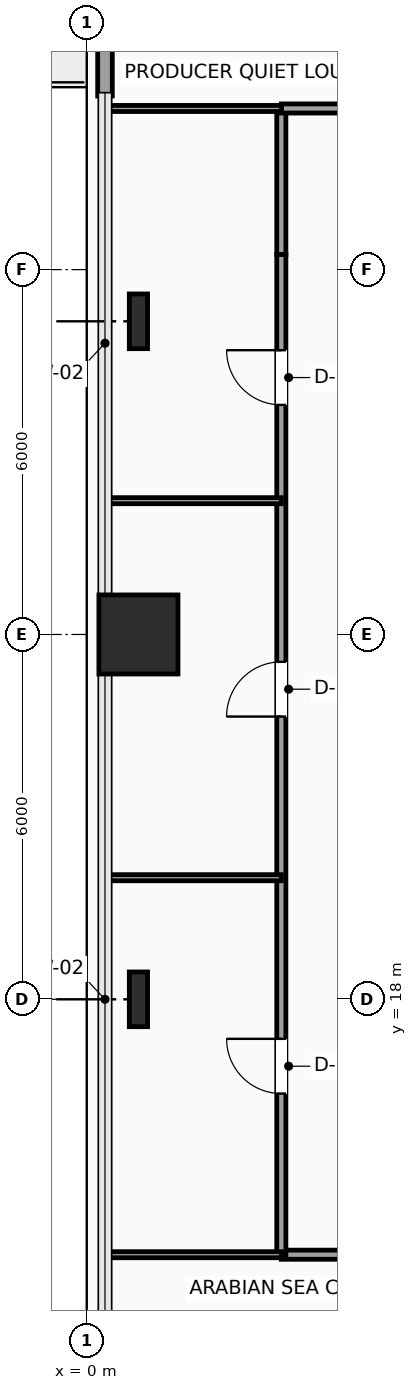
"""IFC4 building model, lengths in metres.
Left out: names, types, materials, properties, quantities, classifications, styles, units other than length and angle.
Written with IfcOpenShell. Run it as: python <this file> out.ifc"""

import sys

from ifc_helpers import new_model, si_unit, direction, frame, frame_2d, origin, origin_2d, place, context, subcontext, project, spatial, rectangle, i_section, extrude, element, fill, save


model = new_model("IFC4")
c1 = context("Model", 3, precision=1e-05, world=origin(), true_north=direction((0.0, 1.0)))
c2 = subcontext(c1, "Body", "Model", "MODEL_VIEW")
j1 = project(units=[si_unit("LENGTHUNIT", "METRE"), si_unit("PLANEANGLEUNIT", "RADIAN")], contexts=[c1])
p1 = place(None, origin())
s1 = spatial("IfcSite", under=j1, at=p1, CompositionType="ELEMENT")
p2 = place(p1, origin())
s2 = spatial("IfcBuilding", under=s1, at=p2, CompositionType="ELEMENT")
p3 = place(p2, frame((0.0, 0.0, 40.2)))
s3 = spatial("IfcBuildingStorey", under=s2, at=p3, CompositionType="ELEMENT", Elevation=40.2)
p4 = place(p3, frame((0.85, 18.0, 0.0), z_axis=(0.0, 0.0, 1.0), x_axis=(1.0, 0.0, 0.0)))
e1 = element("IfcColumn", 1, at=p4, inside=s3, PredefinedType="COLUMN", context=c2, shape_type="SweptSolid", body=[
    extrude(i_section(OverallWidth=0.3, OverallDepth=0.9, WebThickness=0.019, FlangeThickness=0.035, FilletRadius=0.03, at=origin_2d()), origin(), (0.0, 0.0, 1.0), 3.9),
])
p5 = place(p3, frame((0.85, 24.0, 0.0), z_axis=(0.0, 0.0, 1.0), x_axis=(1.0, 0.0, 0.0)))
e2 = element("IfcColumn", 2, at=p5, inside=s3, PredefinedType="COLUMN", context=c2, shape_type="SweptSolid", body=[
    extrude(rectangle(XDim=1.3, YDim=1.3, at=origin_2d()), origin(), (0.0, 0.0, 1.0), 3.9),
])
p6 = place(p3, frame((0.85, 29.15, 0.0), z_axis=(0.0, 0.0, 1.0), x_axis=(1.0, 0.0, 0.0)))
e3 = element("IfcColumn", 3, at=p6, inside=s3, PredefinedType="COLUMN", context=c2, shape_type="SweptSolid", body=[
    extrude(i_section(OverallWidth=0.3, OverallDepth=0.9, WebThickness=0.019, FlangeThickness=0.035, FilletRadius=0.03, at=origin_2d()), origin(), (0.0, 0.0, 1.0), 3.9),
])
p7 = place(p3, frame((0.3, 32.855, 0.0), z_axis=(0.0, 0.0, 1.0), x_axis=(0.0, 1.0, 0.0)))
e4 = element("IfcWall", 4, at=p7, inside=s3, PredefinedType="SOLIDWALL", context=c2, shape_type="SweptSolid", body=[
    extrude(rectangle(XDim=9.29, YDim=0.24, at=frame_2d((4.645, 0.0))), origin(), (0.0, 0.0, 1.0), 3.65),
])
p8 = place(p7, frame((3.945, 0.0, 0.0)))
e5 = element("IfcOpeningElement", 5, at=p8, cuts=e4, PredefinedType="OPENING", context=c2, shape_type="SweptSolid", body=[
    extrude(rectangle(XDim=1.05, YDim=2.2, at=frame_2d((0.525, 1.1))), frame((0.0, 0.13, 0.0), z_axis=(0.0, -1.0, 0.0), x_axis=(1.0, 0.0, 0.0)), (0.0, 0.0, 1.0), 0.26),
])
p9 = place(p3, frame((5.15, 13.8, 0.0), z_axis=(0.0, 0.0, 1.0), x_axis=(-1.0, 0.0, 0.0)))
e6 = element("IfcWall", 6, at=p9, inside=s3, PredefinedType="PARTITIONING", context=c2, shape_type="SweptSolid", body=[
    extrude(rectangle(XDim=1.95, YDim=0.15, at=frame_2d((0.975, 0.0))), origin(), (0.0, 0.0, 1.0), 3.65),
])
p10 = place(p3, frame((3.2, 13.8, 0.0), z_axis=(0.0, 0.0, 1.0), x_axis=(0.0, 1.0, 0.0)))
e7 = element("IfcWall", 7, at=p10, inside=s3, PredefinedType="PARTITIONING", context=c2, shape_type="SweptSolid", body=[
    extrude(rectangle(XDim=16.45, YDim=0.15, at=frame_2d((8.225, 0.0))), origin(), (0.0, 0.0, 1.0), 3.65),
])
p11 = place(p10, frame((2.65, 0.0, 0.0)))
e8 = element("IfcOpeningElement", 8, at=p11, cuts=e7, PredefinedType="OPENING", context=c2, shape_type="SweptSolid", body=[
    extrude(rectangle(XDim=0.9, YDim=2.1, at=frame_2d((0.45, 1.05))), frame((0.0, 0.085, 0.0), z_axis=(0.0, -1.0, 0.0), x_axis=(1.0, 0.0, 0.0)), (0.0, 0.0, 1.0), 0.17),
])
p12 = place(p10, frame((8.85, 0.0, 0.0)))
e9 = element("IfcOpeningElement", 9, at=p12, cuts=e7, PredefinedType="OPENING", context=c2, shape_type="SweptSolid", body=[
    extrude(rectangle(XDim=0.9, YDim=2.1, at=frame_2d((0.45, 1.05))), frame((0.0, 0.085, 0.0), z_axis=(0.0, -1.0, 0.0), x_axis=(1.0, 0.0, 0.0)), (0.0, 0.0, 1.0), 0.17),
])
p13 = place(p10, frame((13.975, 0.0, 0.0)))
e10 = element("IfcOpeningElement", 10, at=p13, cuts=e7, PredefinedType="OPENING", context=c2, shape_type="SweptSolid", body=[
    extrude(rectangle(XDim=0.9, YDim=2.1, at=frame_2d((0.45, 1.05))), frame((0.0, 0.085, 0.0), z_axis=(0.0, -1.0, 0.0), x_axis=(1.0, 0.0, 0.0)), (0.0, 0.0, 1.0), 0.17),
])
p14 = place(p3, frame((3.2, 30.25, 0.0), z_axis=(0.0, 0.0, 1.0), x_axis=(0.0, 1.0, 0.0)))
e11 = element("IfcWall", 11, at=p14, inside=s3, PredefinedType="PARTITIONING", context=c2, shape_type="SweptSolid", body=[
    extrude(rectangle(XDim=2.4, YDim=0.15, at=frame_2d((1.2, 0.0))), origin(), (0.0, 0.0, 1.0), 3.65),
])
p15 = place(p3, frame((3.2, 32.65, 0.0), z_axis=(0.0, 0.0, 1.0), x_axis=(1.0, 0.0, 0.0)))
e12 = element("IfcWall", 12, at=p15, inside=s3, PredefinedType="PARTITIONING", context=c2, shape_type="SweptSolid", body=[
    extrude(rectangle(XDim=2.05, YDim=0.15, at=frame_2d((1.025, 0.0))), origin(), (0.0, 0.0, 1.0), 3.65),
])
p16 = place(p3, frame((0.35, 0.35, 0.0), z_axis=(0.0, 0.0, 1.0), x_axis=(-0.003721090209, 0.99999307672, 0.0)))
e13 = element("IfcWall", 13, at=p16, inside=s3, PredefinedType="PARTITIONING", context=c2, shape_type="SweptSolid", body=[
    extrude(rectangle(XDim=13.45, YDim=0.1, at=frame_2d((6.725, 0.0))), origin(), (0.0, 0.0, 1.0), 3.65),
])
for number, where, z_axis, x_axis in (
    (14, (0.3, 13.8, 0.0), (0.0, 0.0, 1.0), (1.0, 0.0, 0.0)),
    (15, (0.3, 20.0, 0.0), (0.0, 0.0, 1.0), (1.0, 0.0, 0.0)),
    (16, (0.3, 26.2, 0.0), (0.0, 0.0, 1.0), (1.0, 0.0, 0.0)),
    (17, (0.3, 32.65, 0.0), (0.0, 0.0, 1.0), (1.0, 0.0, 0.0)),
):
    element("IfcWall", number, at=place(p3, frame(where, z_axis=z_axis, x_axis=x_axis)), inside=s3, PredefinedType="PARTITIONING", context=c2, shape_type="SweptSolid", body=[
        extrude(rectangle(XDim=2.9, YDim=0.1, at=frame_2d((1.45, 0.0))), origin(), (0.0, 0.0, 1.0), 3.65),
    ])
p17 = place(p11, origin())
e18 = element("IfcDoor", 18, at=p17, inside=s3, OperationType="SINGLE_SWING_RIGHT", PredefinedType="DOOR", context=c2, shape_type="SweptSolid", body=[
    extrude(rectangle(XDim=0.9, YDim=2.1, at=frame_2d((0.45, 1.05))), frame((0.0, 0.025, 0.0), z_axis=(0.0, -1.0, 0.0), x_axis=(1.0, 0.0, 0.0)), (0.0, 0.0, 1.0), 0.05),
])
fill(e8, e18)
p18 = place(p12, origin())
e19 = element("IfcDoor", 19, at=p18, inside=s3, OperationType="SINGLE_SWING_LEFT", PredefinedType="DOOR", context=c2, shape_type="SweptSolid", body=[
    extrude(rectangle(XDim=0.9, YDim=2.1, at=frame_2d((0.45, 1.05))), frame((0.0, 0.025, 0.0), z_axis=(0.0, -1.0, 0.0), x_axis=(1.0, 0.0, 0.0)), (0.0, 0.0, 1.0), 0.05),
])
fill(e9, e19)
p19 = place(p13, origin())
e20 = element("IfcDoor", 20, at=p19, inside=s3, OperationType="SINGLE_SWING_RIGHT", PredefinedType="DOOR", context=c2, shape_type="SweptSolid", body=[
    extrude(rectangle(XDim=0.9, YDim=2.1, at=frame_2d((0.45, 1.05))), frame((0.0, 0.025, 0.0), z_axis=(0.0, -1.0, 0.0), x_axis=(1.0, 0.0, 0.0)), (0.0, 0.0, 1.0), 0.05),
])
fill(e10, e20)
save(model, sys.argv[1])
